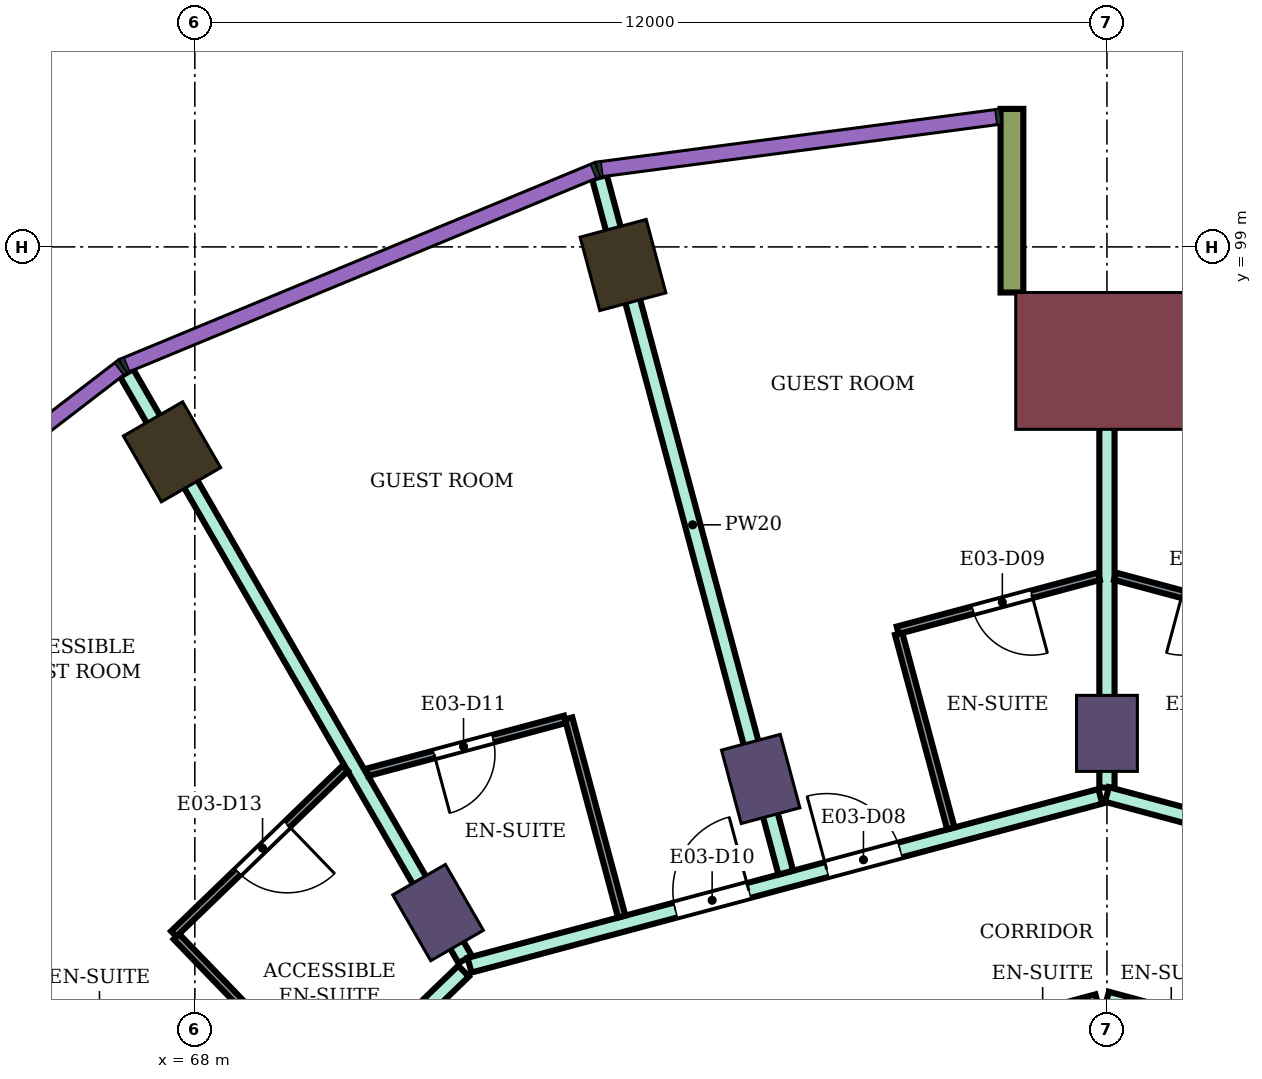
"""IFC4 building model, lengths in metres.
Left out: names, types, materials, properties, quantities, classifications, styles, units other than length and angle.
Written with IfcOpenShell. Run it as: python <this file> out.ifc"""

import sys

from ifc_helpers import new_model, si_unit, direction, frame, frame_2d, origin, origin_2d, place, context, subcontext, project, spatial, rectangle, extrude, element, fill, save


model = new_model("IFC4")
c1 = context("Model", 3, precision=1e-05, world=origin(), true_north=direction((0.0, 1.0)))
c2 = subcontext(c1, "Body", "Model", "MODEL_VIEW")
j1 = project(units=[si_unit("LENGTHUNIT", "METRE"), si_unit("PLANEANGLEUNIT", "RADIAN")], contexts=[c1])
p1 = place(None, origin())
s1 = spatial("IfcSite", under=j1, at=p1, CompositionType="ELEMENT")
p2 = place(p1, origin())
s2 = spatial("IfcBuilding", under=s1, at=p2, CompositionType="ELEMENT")
p3 = place(p2, frame((0.0, 0.0, 141.9)))
s3 = spatial("IfcBuildingStorey", under=s2, at=p3, CompositionType="ELEMENT", Elevation=141.9)
for number, where, z_axis, x_axis in (
    (1, (73.633, 98.762, 0.0), (0.0, 0.0, 1.0), (-0.259, 0.966, 0.0)),
    (2, (67.7, 96.304, 0.0), (0.0, 0.0, 1.0), (-0.5, 0.866, 0.0)),
):
    element("IfcColumn", number, at=place(p3, frame(where, z_axis=z_axis, x_axis=x_axis)), inside=s3, PredefinedType="COLUMN", context=c2, shape_type="SweptSolid", body=[
        extrude(rectangle(XDim=1.0, YDim=0.9, at=origin_2d()), origin(), (0.0, 0.0, 1.0), 3.9),
    ])
for number, where, z_axis, x_axis in (
    (3, (80.0, 92.6, 0.0), (0.0, 0.0, 1.0), (0.0, 1.0, 0.0)),
    (4, (75.445, 92.0, 0.0), (0.0, 0.0, 1.0), (-0.259, 0.966, 0.0)),
    (5, (71.2, 90.242, 0.0), (0.0, 0.0, 1.0), (-0.5, 0.866, 0.0)),
):
    element("IfcColumn", number, at=place(p3, frame(where, z_axis=z_axis, x_axis=x_axis)), inside=s3, PredefinedType="COLUMN", context=c2, shape_type="SweptSolid", body=[
        extrude(rectangle(XDim=1.0, YDim=0.8, at=origin_2d()), origin(), (0.0, 0.0, 1.0), 3.9),
    ])
p4 = place(p3, frame((80.0, 97.5, 0.0), z_axis=(0.0, 0.0, 1.0), x_axis=(0.0, 1.0, 0.0)))
e6 = element("IfcColumn", 6, at=p4, inside=s3, PredefinedType="COLUMN", context=c2, shape_type="SweptSolid", body=[
    extrude(rectangle(XDim=1.8, YDim=2.4, at=origin_2d()), origin(), (0.0, 0.0, 1.0), 3.9),
])
p5 = place(p3, frame((78.75, 98.4, 0.0), z_axis=(0.0, 0.0, 1.0), x_axis=(0.0, 1.0, 0.0)))
e7 = element("IfcWall", 7, at=p5, inside=s3, PredefinedType="NOTDEFINED", context=c2, shape_type="SweptSolid", body=[
    extrude(rectangle(XDim=2.416, YDim=0.3, at=frame_2d((1.208, 0.0))), origin(), (0.0, 0.0, 1.0), 3.9),
])
p6 = place(p3, frame((63.596, 91.406, 0.0), z_axis=(0.0, 0.0, 1.0), x_axis=(0.706963264491, -0.707250268759, 0.0)))
e8 = element("IfcWall", 8, at=p6, inside=s3, PredefinedType="PARTITIONING", context=c2, shape_type="SweptSolid", body=[
    extrude(rectangle(XDim=6.805, YDim=0.2, at=frame_2d((3.403, 0.0))), origin(), (0.0, 0.0, 1.0), 3.45),
])
p7 = place(p3, frame((66.797, 84.9, 0.0), z_axis=(0.0, 0.0, 1.0), x_axis=(0.719692092412, 0.694293376116, 0.0)))
e9 = element("IfcWall", 9, at=p7, inside=s3, PredefinedType="PARTITIONING", context=c2, shape_type="SweptSolid", body=[
    extrude(rectangle(XDim=6.584, YDim=0.2, at=frame_2d((3.292, 0.0))), origin(), (0.0, 0.0, 1.0), 3.45),
])
p8 = place(p7, frame((2.852, 0.0, 0.0)))
e10 = element("IfcOpeningElement", 10, at=p8, cuts=e9, PredefinedType="OPENING", context=c2, shape_type="SweptSolid", body=[
    extrude(rectangle(XDim=1.1, YDim=2.1, at=frame_2d((0.55, 1.05))), frame((0.0, 0.11, 0.0), z_axis=(0.0, -1.0, 0.0), x_axis=(1.0, 0.0, 0.0)), (0.0, 0.0, 1.0), 0.22),
])
p9 = place(p3, frame((67.103, 97.342, 0.0), z_axis=(0.0, 0.0, 1.0), x_axis=(0.499900389553, -0.866082906265, 0.0)))
e11 = element("IfcWall", 11, at=p9, inside=s3, PredefinedType="PARTITIONING", context=c2, shape_type="SweptSolid", body=[
    extrude(rectangle(XDim=8.908, YDim=0.2, at=frame_2d((4.454, 0.0))), origin(), (0.0, 0.0, 1.0), 3.45),
])
p10 = place(p3, frame((71.614, 89.55, 0.0), z_axis=(0.0, 0.0, 1.0), x_axis=(0.965982156828, 0.258608725086, 0.0)))
e12 = element("IfcWall", 12, at=p10, inside=s3, PredefinedType="PARTITIONING", context=c2, shape_type="SweptSolid", body=[
    extrude(rectangle(XDim=8.592, YDim=0.2, at=frame_2d((4.296, 0.0))), origin(), (0.0, 0.0, 1.0), 3.45),
])
p11 = place(p10, frame((4.865, 0.0, 0.0)))
e13 = element("IfcOpeningElement", 13, at=p11, cuts=e12, PredefinedType="OPENING", context=c2, shape_type="SweptSolid", body=[
    extrude(rectangle(XDim=1.0, YDim=2.1, at=frame_2d((0.5, 1.05))), frame((0.0, 0.11, 0.0), z_axis=(0.0, -1.0, 0.0), x_axis=(1.0, 0.0, 0.0)), (0.0, 0.0, 1.0), 0.22),
])
p12 = place(p10, frame((2.804, 0.0, 0.0)))
e14 = element("IfcOpeningElement", 14, at=p12, cuts=e12, PredefinedType="OPENING", context=c2, shape_type="SweptSolid", body=[
    extrude(rectangle(XDim=1.0, YDim=2.1, at=frame_2d((0.5, 1.05))), frame((0.0, 0.11, 0.0), z_axis=(0.0, -1.0, 0.0), x_axis=(1.0, 0.0, 0.0)), (0.0, 0.0, 1.0), 0.22),
])
p13 = place(p3, frame((73.071, 87.247, 0.0), z_axis=(0.0, 0.0, 1.0), x_axis=(0.965931651205, 0.258797305243, 0.0)))
e15 = element("IfcWall", 15, at=p13, inside=s3, PredefinedType="PARTITIONING", context=c2, shape_type="SweptSolid", body=[
    extrude(rectangle(XDim=7.043, YDim=0.2, at=frame_2d((3.521, 0.0))), origin(), (0.0, 0.0, 1.0), 3.45),
])
p14 = place(p13, frame((0.41, 0.0, 0.0)))
e16 = element("IfcOpeningElement", 16, at=p14, cuts=e15, PredefinedType="OPENING", context=c2, shape_type="SweptSolid", body=[
    extrude(rectangle(XDim=1.0, YDim=2.1, at=frame_2d((0.5, 1.05))), frame((0.0, 0.11, 0.0), z_axis=(0.0, -1.0, 0.0), x_axis=(1.0, 0.0, 0.0)), (0.0, 0.0, 1.0), 0.22),
])
p15 = place(p3, frame((73.323, 99.919, 0.0), z_axis=(0.0, 0.0, 1.0), x_axis=(0.258817230439, -0.965926312525, 0.0)))
e17 = element("IfcWall", 17, at=p15, inside=s3, PredefinedType="PARTITIONING", context=c2, shape_type="SweptSolid", body=[
    extrude(rectangle(XDim=9.474, YDim=0.2, at=frame_2d((4.737, 0.0))), origin(), (0.0, 0.0, 1.0), 3.45),
])
p16 = place(p3, frame((80.0, 89.104, 0.0), z_axis=(0.0, 0.0, 1.0), x_axis=(0.965854247166, -0.25908603442, 0.0)))
e18 = element("IfcWall", 18, at=p16, inside=s3, PredefinedType="PARTITIONING", context=c2, shape_type="SweptSolid", body=[
    extrude(rectangle(XDim=7.183, YDim=0.2, at=frame_2d((3.592, 0.0))), origin(), (0.0, 0.0, 1.0), 3.45),
])
p17 = place(p16, frame((5.763, 0.0, 0.0)))
e19 = element("IfcOpeningElement", 19, at=p17, cuts=e18, PredefinedType="OPENING", context=c2, shape_type="SweptSolid", body=[
    extrude(rectangle(XDim=1.0, YDim=2.1, at=frame_2d((0.5, 1.05))), frame((0.0, 0.11, 0.0), z_axis=(0.0, -1.0, 0.0), x_axis=(1.0, 0.0, 0.0)), (0.0, 0.0, 1.0), 0.22),
])
p18 = place(p3, frame((80.0, 91.886, 0.0), z_axis=(0.0, 0.0, 1.0), x_axis=(0.0, 1.0, 0.0)))
e20 = element("IfcWall", 20, at=p18, inside=s3, PredefinedType="PARTITIONING", context=c2, shape_type="SweptSolid", body=[
    extrude(rectangle(XDim=6.314, YDim=0.2, at=frame_2d((3.157, 0.0))), origin(), (0.0, 0.0, 1.0), 3.45),
])
p19 = place(p3, frame((80.0, 91.796, 0.0), z_axis=(0.0, 0.0, 1.0), x_axis=(0.965891796243, -0.258946013582, 0.0)))
e21 = element("IfcWall", 21, at=p19, inside=s3, PredefinedType="PARTITIONING", context=c2, shape_type="SweptSolid", body=[
    extrude(rectangle(XDim=8.642, YDim=0.2, at=frame_2d((4.321, 0.0))), origin(), (0.0, 0.0, 1.0), 3.45),
])
p20 = place(p19, frame((4.877, 0.0, 0.0)))
e22 = element("IfcOpeningElement", 22, at=p20, cuts=e21, PredefinedType="OPENING", context=c2, shape_type="SweptSolid", body=[
    extrude(rectangle(XDim=1.0, YDim=2.1, at=frame_2d((0.5, 1.05))), frame((0.0, 0.11, 0.0), z_axis=(0.0, -1.0, 0.0), x_axis=(1.0, 0.0, 0.0)), (0.0, 0.0, 1.0), 0.22),
])
p21 = place(p19, frame((2.817, 0.0, 0.0)))
e23 = element("IfcOpeningElement", 23, at=p21, cuts=e21, PredefinedType="OPENING", context=c2, shape_type="SweptSolid", body=[
    extrude(rectangle(XDim=1.0, YDim=2.1, at=frame_2d((0.5, 1.05))), frame((0.0, 0.11, 0.0), z_axis=(0.0, -1.0, 0.0), x_axis=(1.0, 0.0, 0.0)), (0.0, 0.0, 1.0), 0.22),
])
p22 = place(p3, frame((67.758, 89.926, 0.0), z_axis=(0.0, 0.0, 1.0), x_axis=(0.694485934895, -0.719506279495, 0.0)))
e24 = element("IfcWall", 24, at=p22, inside=s3, PredefinedType="PARTITIONING", context=c2, shape_type="SweptSolid", body=[
    extrude(rectangle(XDim=2.849, YDim=0.1, at=frame_2d((1.425, 0.0))), origin(), (0.0, 0.0, 1.0), 3.45),
])
p23 = place(p3, frame((67.723, 89.962, 0.0), z_axis=(0.0, 0.0, 1.0), x_axis=(0.719487277563, 0.694505620873, 0.0)))
e25 = element("IfcWall", 25, at=p23, inside=s3, PredefinedType="PARTITIONING", context=c2, shape_type="SweptSolid", body=[
    extrude(rectangle(XDim=3.137, YDim=0.1, at=frame_2d((1.568, 0.0))), origin(), (0.0, 0.0, 1.0), 3.45),
])
p24 = place(p23, frame((1.173, 0.0, 0.0)))
e26 = element("IfcOpeningElement", 26, at=p24, cuts=e25, PredefinedType="OPENING", context=c2, shape_type="SweptSolid", body=[
    extrude(rectangle(XDim=0.9, YDim=2.1, at=frame_2d((0.45, 1.05))), frame((0.0, 0.06, 0.0), z_axis=(0.0, -1.0, 0.0), x_axis=(1.0, 0.0, 0.0)), (0.0, 0.0, 1.0), 0.12),
])
p25 = place(p3, frame((70.268, 92.087, 0.0), z_axis=(0.0, 0.0, 1.0), x_axis=(0.965937937835, 0.258773839966, 0.0)))
e27 = element("IfcWall", 27, at=p25, inside=s3, PredefinedType="PARTITIONING", context=c2, shape_type="SweptSolid", body=[
    extrude(rectangle(XDim=2.694, YDim=0.1, at=frame_2d((1.347, 0.0))), origin(), (0.0, 0.0, 1.0), 3.45),
])
p26 = place(p25, frame((0.912, 0.0, 0.0)))
e28 = element("IfcOpeningElement", 28, at=p26, cuts=e27, PredefinedType="OPENING", context=c2, shape_type="SweptSolid", body=[
    extrude(rectangle(XDim=0.8, YDim=2.1, at=frame_2d((0.4, 1.05))), frame((0.0, 0.06, 0.0), z_axis=(0.0, -1.0, 0.0), x_axis=(1.0, 0.0, 0.0)), (0.0, 0.0, 1.0), 0.12),
])
p27 = place(p3, frame((72.918, 92.797, 0.0), z_axis=(0.0, 0.0, 1.0), x_axis=(0.25867580527, -0.965964195904, 0.0)))
e29 = element("IfcWall", 29, at=p27, inside=s3, PredefinedType="PARTITIONING", context=c2, shape_type="SweptSolid", body=[
    extrude(rectangle(XDim=2.699, YDim=0.1, at=frame_2d((1.35, 0.0))), origin(), (0.0, 0.0, 1.0), 3.45),
])
p28 = place(p3, frame((77.26, 93.909, 0.0), z_axis=(0.0, 0.0, 1.0), x_axis=(0.258935674139, -0.965894568086, 0.0)))
e30 = element("IfcWall", 30, at=p28, inside=s3, PredefinedType="PARTITIONING", context=c2, shape_type="SweptSolid", body=[
    extrude(rectangle(XDim=2.649, YDim=0.1, at=frame_2d((1.325, 0.0))), origin(), (0.0, 0.0, 1.0), 3.45),
])
p29 = place(p3, frame((77.247, 93.957, 0.0), z_axis=(0.0, 0.0, 1.0), x_axis=(0.965922199757, 0.258832579125, 0.0)))
e31 = element("IfcWall", 31, at=p29, inside=s3, PredefinedType="PARTITIONING", context=c2, shape_type="SweptSolid", body=[
    extrude(rectangle(XDim=2.74, YDim=0.1, at=frame_2d((1.37, 0.0))), origin(), (0.0, 0.0, 1.0), 3.45),
])
p30 = place(p29, frame((1.025, 0.0, 0.0)))
e32 = element("IfcOpeningElement", 32, at=p30, cuts=e31, PredefinedType="OPENING", context=c2, shape_type="SweptSolid", body=[
    extrude(rectangle(XDim=0.8, YDim=2.1, at=frame_2d((0.4, 1.05))), frame((0.0, 0.06, 0.0), z_axis=(0.0, -1.0, 0.0), x_axis=(1.0, 0.0, 0.0)), (0.0, 0.0, 1.0), 0.12),
])
p31 = place(p3, frame((80.106, 94.667, 0.0), z_axis=(0.0, 0.0, 1.0), x_axis=(0.96589821458, -0.258922071427, 0.0)))
e33 = element("IfcWall", 33, at=p31, inside=s3, PredefinedType="PARTITIONING", context=c2, shape_type="SweptSolid", body=[
    extrude(rectangle(XDim=2.69, YDim=0.1, at=frame_2d((1.345, 0.0))), origin(), (0.0, 0.0, 1.0), 3.45),
])
p32 = place(p31, frame((0.915, 0.0, 0.0)))
e34 = element("IfcOpeningElement", 34, at=p32, cuts=e33, PredefinedType="OPENING", context=c2, shape_type="SweptSolid", body=[
    extrude(rectangle(XDim=0.8, YDim=2.1, at=frame_2d((0.4, 1.05))), frame((0.0, 0.06, 0.0), z_axis=(0.0, -1.0, 0.0), x_axis=(1.0, 0.0, 0.0)), (0.0, 0.0, 1.0), 0.12),
])
p33 = place(p32, frame((0.8, 0.0, 0.0), z_axis=(0.0, 0.0, 1.0), x_axis=(-1.0, 0.0, 0.0)))
e35 = element("IfcDoor", 35, at=p33, inside=s3, OperationType="SINGLE_SWING_RIGHT", PredefinedType="DOOR", context=c2, shape_type="SweptSolid", body=[
    extrude(rectangle(XDim=0.8, YDim=2.1, at=frame_2d((0.4, 1.05))), frame((0.0, 0.025, 0.0), z_axis=(0.0, -1.0, 0.0), x_axis=(1.0, 0.0, 0.0)), (0.0, 0.0, 1.0), 0.05),
])
fill(e34, e35)
p34 = place(p11, origin())
e36 = element("IfcDoor", 36, at=p34, inside=s3, OperationType="SINGLE_SWING_LEFT", PredefinedType="DOOR", context=c2, shape_type="SweptSolid", body=[
    extrude(rectangle(XDim=1.0, YDim=2.1, at=frame_2d((0.5, 1.05))), frame((0.0, 0.025, 0.0), z_axis=(0.0, -1.0, 0.0), x_axis=(1.0, 0.0, 0.0)), (0.0, 0.0, 1.0), 0.05),
])
fill(e13, e36)
p35 = place(p30, frame((0.8, 0.0, 0.0), z_axis=(0.0, 0.0, 1.0), x_axis=(-1.0, 0.0, 0.0)))
e37 = element("IfcDoor", 37, at=p35, inside=s3, OperationType="SINGLE_SWING_LEFT", PredefinedType="DOOR", context=c2, shape_type="SweptSolid", body=[
    extrude(rectangle(XDim=0.8, YDim=2.1, at=frame_2d((0.4, 1.05))), frame((0.0, 0.025, 0.0), z_axis=(0.0, -1.0, 0.0), x_axis=(1.0, 0.0, 0.0)), (0.0, 0.0, 1.0), 0.05),
])
fill(e32, e37)
p36 = place(p12, origin())
e38 = element("IfcDoor", 38, at=p36, inside=s3, OperationType="SINGLE_SWING_RIGHT", PredefinedType="DOOR", context=c2, shape_type="SweptSolid", body=[
    extrude(rectangle(XDim=1.0, YDim=2.1, at=frame_2d((0.5, 1.05))), frame((0.0, 0.025, 0.0), z_axis=(0.0, -1.0, 0.0), x_axis=(1.0, 0.0, 0.0)), (0.0, 0.0, 1.0), 0.05),
])
fill(e14, e38)
p37 = place(p26, frame((0.8, 0.0, 0.0), z_axis=(0.0, 0.0, 1.0), x_axis=(-1.0, 0.0, 0.0)))
e39 = element("IfcDoor", 39, at=p37, inside=s3, OperationType="SINGLE_SWING_RIGHT", PredefinedType="DOOR", context=c2, shape_type="SweptSolid", body=[
    extrude(rectangle(XDim=0.8, YDim=2.1, at=frame_2d((0.4, 1.05))), frame((0.0, 0.025, 0.0), z_axis=(0.0, -1.0, 0.0), x_axis=(1.0, 0.0, 0.0)), (0.0, 0.0, 1.0), 0.05),
])
fill(e28, e39)
p38 = place(p24, frame((0.9, 0.0, 0.0), z_axis=(0.0, 0.0, 1.0), x_axis=(-1.0, 0.0, 0.0)))
e40 = element("IfcDoor", 40, at=p38, inside=s3, OperationType="SINGLE_SWING_LEFT", PredefinedType="DOOR", context=c2, shape_type="SweptSolid", body=[
    extrude(rectangle(XDim=0.9, YDim=2.1, at=frame_2d((0.45, 1.05))), frame((0.0, 0.025, 0.0), z_axis=(0.0, -1.0, 0.0), x_axis=(1.0, 0.0, 0.0)), (0.0, 0.0, 1.0), 0.05),
])
fill(e26, e40)
save(model, sys.argv[1])
